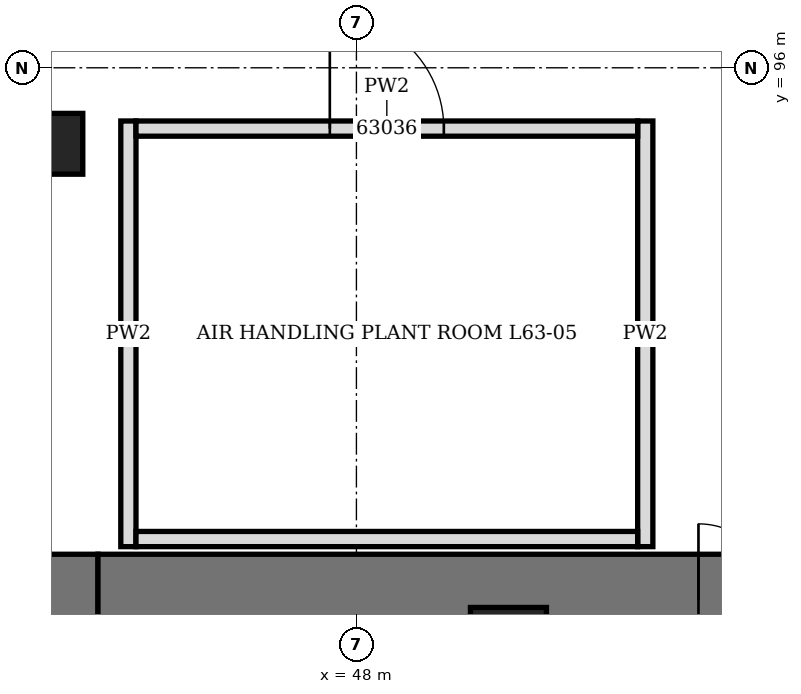
"""IFC4 building model, lengths in metres.
Left out: names, types, materials, properties, quantities, classifications, styles, units other than length and angle.
Written with IfcOpenShell. Run it as: python <this file> out.ifc"""

import sys

from ifc_helpers import new_model, si_unit, direction, frame, frame_2d, origin, origin_2d, place, context, subcontext, project, spatial, rectangle, hollow_rectangle, extrude, clip, halfspace, element, fill, save


model = new_model("IFC4")
c1 = context("Model", 3, precision=1e-05, world=origin(), true_north=direction((0.0, 1.0)))
c2 = subcontext(c1, "Body", "Model", "MODEL_VIEW")
j1 = project(units=[si_unit("LENGTHUNIT", "METRE"), si_unit("PLANEANGLEUNIT", "RADIAN")], contexts=[c1])
p1 = place(None, origin())
s1 = spatial("IfcSite", under=j1, at=p1, CompositionType="ELEMENT")
p2 = place(p1, origin())
s2 = spatial("IfcBuilding", under=s1, at=p2, CompositionType="ELEMENT")
p3 = place(p2, frame((0.0, 0.0, 279.7)))
s3 = spatial("IfcBuildingStorey", under=s2, at=p3, CompositionType="ELEMENT", Elevation=279.7)
p4 = place(p3, frame((44.0, 95.0, -0.25), z_axis=(0.0, 0.0, 1.0), x_axis=(0.0, 1.0, 0.0)))
e1 = element("IfcColumn", 1, at=p4, inside=s3, PredefinedType="COLUMN", context=c2, shape_type="SweptSolid", body=[
    extrude(hollow_rectangle(XDim=0.8, YDim=0.8, WallThickness=0.1, at=origin_2d()), origin(), (0.0, 0.0, 1.0), 6.25),
])
p5 = place(p3, frame((40.75, 95.25, -0.25), z_axis=(0.418919145253, -0.418919145253, 0.805613740871), x_axis=(0.707106781187, 0.707106781187, 0.0)))
e2 = element("IfcColumn", 2, at=p5, inside=s3, PredefinedType="COLUMN", context=c2, shape_type="Clipping", body=[
    clip(clip(extrude(hollow_rectangle(XDim=0.8, YDim=0.8, WallThickness=0.1, at=origin_2d()), origin(), (0.0, 0.0, 1.0), 7.758), halfspace(frame((0.0, 0.0, 0.297), z_axis=(0.0, 0.0, 1.0), x_axis=(1.0, 0.0, 0.0)), True)), halfspace(frame((0.0, 0.0, 7.461), z_axis=(0.0, 0.0, -1.0), x_axis=(1.0, 0.0, 0.0)), True)),
])
p6 = place(p3, frame((44.0, 70.4, 0.0), z_axis=(0.0, 0.0, 1.0), x_axis=(0.0, 1.0, 0.0)))
e3 = element("IfcWall", 3, at=p6, inside=s3, PredefinedType="SHEAR", context=c2, shape_type="SweptSolid", body=[
    extrude(rectangle(XDim=19.2, YDim=1.2, at=frame_2d((9.6, 0.0))), origin(), (0.0, 0.0, 1.0), 6.0),
])
p7 = place(p6, frame((8.6, 0.0, 0.0)))
e4 = element("IfcOpeningElement", 4, at=p7, cuts=e3, PredefinedType="OPENING", context=c2, shape_type="SweptSolid", body=[
    extrude(rectangle(XDim=2.0, YDim=2.4, at=frame_2d((1.0, 1.2))), frame((0.0, 0.61, 0.0), z_axis=(0.0, -1.0, 0.0), x_axis=(1.0, 0.0, 0.0)), (0.0, 0.0, 1.0), 1.22),
])
p8 = place(p3, frame((44.6, 89.0, 0.0), z_axis=(0.0, 0.0, 1.0), x_axis=(1.0, 0.0, 0.0)))
e5 = element("IfcWall", 5, at=p8, inside=s3, PredefinedType="SHEAR", context=c2, shape_type="SweptSolid", body=[
    extrude(rectangle(XDim=22.8, YDim=1.2, at=frame_2d((11.4, 0.0))), origin(), (0.0, 0.0, 1.0), 6.0),
])
p9 = place(p8, frame((7.9, 0.0, 0.0)))
e6 = element("IfcOpeningElement", 6, at=p9, cuts=e5, PredefinedType="OPENING", context=c2, shape_type="SweptSolid", body=[
    extrude(rectangle(XDim=1.0, YDim=2.1, at=frame_2d((0.5, 1.05))), frame((0.0, 0.61, 0.0), z_axis=(0.0, -1.0, 0.0), x_axis=(1.0, 0.0, 0.0)), (0.0, 0.0, 1.0), 1.22),
])
p10 = place(p8, frame((12.025, 0.0, 0.0)))
e7 = element("IfcOpeningElement", 7, at=p10, cuts=e5, PredefinedType="OPENING", context=c2, shape_type="SweptSolid", body=[
    extrude(rectangle(XDim=0.9, YDim=2.1, at=frame_2d((0.45, 1.05))), frame((0.0, 0.61, 0.0), z_axis=(0.0, -1.0, 0.0), x_axis=(1.0, 0.0, 0.0)), (0.0, 0.0, 1.0), 1.22),
])
p11 = place(p8, frame((13.962, 0.0, 0.0)))
e8 = element("IfcOpeningElement", 8, at=p11, cuts=e5, PredefinedType="OPENING", context=c2, shape_type="SweptSolid", body=[
    extrude(rectangle(XDim=0.9, YDim=2.1, at=frame_2d((0.45, 1.05))), frame((0.0, 0.61, 0.0), z_axis=(0.0, -1.0, 0.0), x_axis=(1.0, 0.0, 0.0)), (0.0, 0.0, 1.0), 1.22),
])
p12 = place(p3, frame((50.0, 88.4, 0.0), z_axis=(0.0, 0.0, 1.0), x_axis=(1.0, 0.0, 0.0)))
e9 = element("IfcColumn", 9, at=p12, inside=s3, PredefinedType="COLUMN", context=c2, shape_type="SweptSolid", body=[
    extrude(hollow_rectangle(XDim=1.0, YDim=1.0, WallThickness=0.15, at=origin_2d()), origin(), (0.0, 0.0, 1.0), 6.0),
])
for number, where, z_axis, x_axis in (
    (10, (45.0, 89.7, 0.0), (0.0, 0.0, 1.0), (0.0, 1.0, 0.0)),
    (11, (51.8, 89.7, 0.0), (0.0, 0.0, 1.0), (0.0, 1.0, 0.0)),
):
    element("IfcWall", number, at=place(p3, frame(where, z_axis=z_axis, x_axis=x_axis)), inside=s3, PredefinedType="PARTITIONING", context=c2, shape_type="SweptSolid", body=[
        extrude(rectangle(XDim=5.6, YDim=0.2, at=frame_2d((2.8, 0.0))), origin(), (0.0, 0.0, 1.0), 5.75),
    ])
p13 = place(p3, frame((45.1, 89.8, 0.0), z_axis=(0.0, 0.0, 1.0), x_axis=(1.0, 0.0, 0.0)))
e12 = element("IfcWall", 12, at=p13, inside=s3, PredefinedType="PARTITIONING", context=c2, shape_type="SweptSolid", body=[
    extrude(rectangle(XDim=6.6, YDim=0.2, at=frame_2d((3.3, 0.0))), origin(), (0.0, 0.0, 1.0), 5.75),
])
p14 = place(p3, frame((45.1, 95.2, 0.0), z_axis=(0.0, 0.0, 1.0), x_axis=(1.0, 0.0, 0.0)))
e13 = element("IfcWall", 13, at=p14, inside=s3, PredefinedType="PARTITIONING", context=c2, shape_type="SweptSolid", body=[
    extrude(rectangle(XDim=6.6, YDim=0.2, at=frame_2d((3.3, 0.0))), origin(), (0.0, 0.0, 1.0), 5.75),
])
p15 = place(p14, frame((2.55, 0.0, 0.0)))
e14 = element("IfcOpeningElement", 14, at=p15, cuts=e13, PredefinedType="OPENING", context=c2, shape_type="SweptSolid", body=[
    extrude(rectangle(XDim=1.5, YDim=2.4, at=frame_2d((0.75, 1.2))), frame((0.0, 0.11, 0.0), z_axis=(0.0, -1.0, 0.0), x_axis=(1.0, 0.0, 0.0)), (0.0, 0.0, 1.0), 0.22),
])
p16 = place(p9, origin())
e15 = element("IfcDoor", 15, at=p16, inside=s3, OperationType="SINGLE_SWING_LEFT", PredefinedType="DOOR", context=c2, shape_type="SweptSolid", body=[
    extrude(rectangle(XDim=1.0, YDim=2.1, at=frame_2d((0.5, 1.05))), frame((0.0, 0.35, 0.0), z_axis=(0.0, -1.0, 0.0), x_axis=(1.0, 0.0, 0.0)), (0.0, 0.0, 1.0), 0.7),
])
fill(e6, e15)
p17 = place(p15, origin())
e16 = element("IfcDoor", 16, at=p17, inside=s3, OperationType="DOUBLE_DOOR_SINGLE_SWING", PredefinedType="DOOR", context=c2, shape_type="SweptSolid", body=[
    extrude(rectangle(XDim=1.5, YDim=2.4, at=frame_2d((0.75, 1.2))), frame((0.0, 0.1, 0.0), z_axis=(0.0, -1.0, 0.0), x_axis=(1.0, 0.0, 0.0)), (0.0, 0.0, 1.0), 0.199),
])
fill(e14, e16)
save(model, sys.argv[1])
